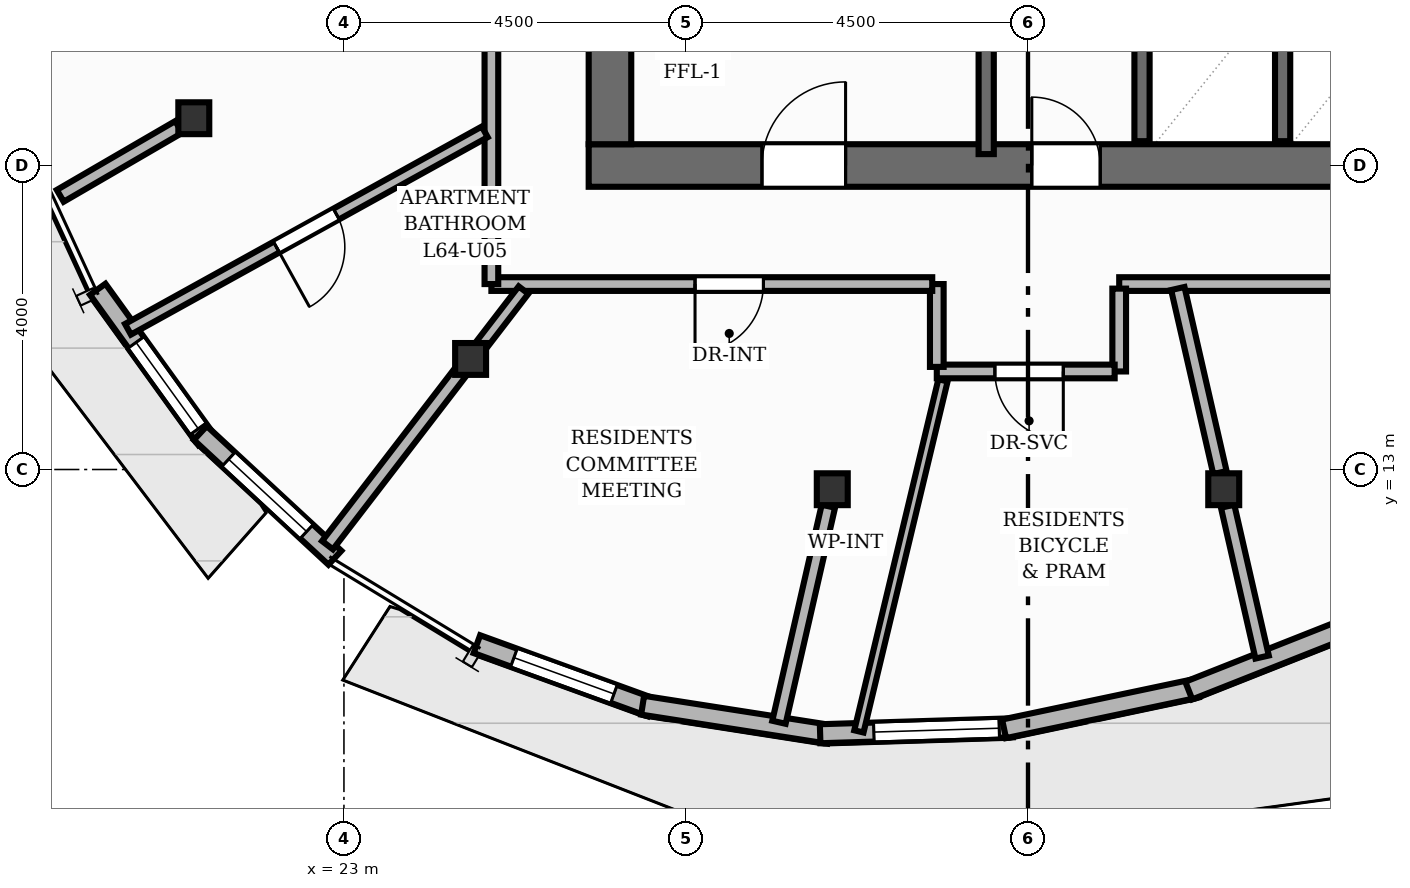
"""IFC4 building model, lengths in metres.
Left out: names, types, materials, properties, quantities, classifications, styles, units other than length and angle.
Written with IfcOpenShell. Run it as: python <this file> out.ifc"""

import sys

from ifc_helpers import new_model, si_unit, direction, frame, frame_2d, origin, origin_2d, place, context, subcontext, project, spatial, rectangle, i_section, extrude, element, fill, save


model = new_model("IFC4")
c1 = context("Model", 3, precision=1e-05, world=origin(), true_north=direction((0.0, 1.0)))
c2 = subcontext(c1, "Body", "Model", "MODEL_VIEW")
j1 = project(units=[si_unit("LENGTHUNIT", "METRE"), si_unit("PLANEANGLEUNIT", "RADIAN")], contexts=[c1])
p1 = place(None, origin())
s1 = spatial("IfcSite", under=j1, at=p1, CompositionType="ELEMENT")
p2 = place(p1, origin())
s2 = spatial("IfcBuilding", under=s1, at=p2, CompositionType="ELEMENT")
p3 = place(p2, frame((0.0, 0.0, 214.24)))
s3 = spatial("IfcBuildingStorey", under=s2, at=p3, CompositionType="ELEMENT", Elevation=214.24)
p4 = place(p3, frame((26.22, 17.0, 0.0), z_axis=(0.0, 0.0, 1.0), x_axis=(1.0, 0.0, 0.0)))
e1 = element("IfcWall", 1, at=p4, inside=s3, PredefinedType="SHEAR", context=c2, shape_type="SweptSolid", body=[
    extrude(rectangle(XDim=11.56, YDim=0.56, at=frame_2d((5.78, 0.0))), origin(), (0.0, 0.0, 1.0), 3.2),
])
p5 = place(p4, frame((2.28, 0.0, 0.0)))
e2 = element("IfcOpeningElement", 2, at=p5, cuts=e1, PredefinedType="OPENING", context=c2, shape_type="SweptSolid", body=[
    extrude(rectangle(XDim=1.1, YDim=2.15, at=frame_2d((0.55, 1.075))), frame((0.0, 0.29, 0.0), z_axis=(0.0, -1.0, 0.0), x_axis=(1.0, 0.0, 0.0)), (0.0, 0.0, 1.0), 0.58),
])
p6 = place(p4, frame((5.83, 0.0, 0.0)))
e3 = element("IfcOpeningElement", 3, at=p6, cuts=e1, PredefinedType="OPENING", context=c2, shape_type="SweptSolid", body=[
    extrude(rectangle(XDim=0.9, YDim=2.1, at=frame_2d((0.45, 1.05))), frame((0.0, 0.29, 0.0), z_axis=(0.0, -1.0, 0.0), x_axis=(1.0, 0.0, 0.0)), (0.0, 0.0, 1.0), 0.58),
])
p7 = place(p3, frame((26.5, 17.28, 0.0), z_axis=(0.0, 0.0, 1.0), x_axis=(0.0, 1.0, 0.0)))
e4 = element("IfcWall", 4, at=p7, inside=s3, PredefinedType="SHEAR", context=c2, shape_type="SweptSolid", body=[
    extrude(rectangle(XDim=13.44, YDim=0.56, at=frame_2d((6.72, 0.0))), origin(), (0.0, 0.0, 1.0), 3.2),
])
for number, where, z_axis, x_axis in (
    (5, (21.025, 17.622, 0.0), (0.0, 0.0, 1.0), (1.0, 0.0, 0.0)),
    (6, (24.667, 14.455, 0.0), (0.0, 0.0, 1.0), (1.0, 0.0, 0.0)),
    (7, (29.425, 12.74, 0.0), (0.0, 0.0, 1.0), (1.0, 0.0, 0.0)),
    (8, (34.575, 12.74, 0.0), (0.0, 0.0, 1.0), (1.0, 0.0, 0.0)),
):
    element("IfcColumn", number, at=place(p3, frame(where, z_axis=z_axis, x_axis=x_axis)), inside=s3, PredefinedType="COLUMN", context=c2, shape_type="SweptSolid", body=[
        extrude(i_section(OverallWidth=0.407, OverallDepth=0.419, WebThickness=0.031, FlangeThickness=0.049, at=origin_2d()), origin(), (0.0, 0.0, 1.0), 3.2),
    ])
p8 = place(p3, frame((21.186, 13.395, 0.0), z_axis=(0.0, 0.0, 1.0), x_axis=(-0.584824573101, 0.811159798497, 0.0)))
e9 = element("IfcWall", 9, at=p8, inside=s3, PredefinedType="SOLIDWALL", context=c2, shape_type="SweptSolid", body=[
    extrude(rectangle(XDim=2.437, YDim=0.25, at=frame_2d((1.218, 0.0))), origin(), (0.0, 0.0, 1.0), 2.96),
])
p9 = place(p8, frame((0.175, 0.0, 0.85)))
e10 = element("IfcOpeningElement", 10, at=p9, cuts=e9, PredefinedType="OPENING", context=c2, shape_type="SweptSolid", body=[
    extrude(rectangle(XDim=1.4, YDim=1.55, at=frame_2d((0.7, 0.775))), frame((0.0, 0.135, 0.0), z_axis=(0.0, -1.0, 0.0), x_axis=(1.0, 0.0, 0.0)), (0.0, 0.0, 1.0), 0.27),
])
p10 = place(p3, frame((22.881, 11.839, 0.0), z_axis=(0.0, 0.0, 1.0), x_axis=(-0.733441361842, 0.679752726173, 0.0)))
e11 = element("IfcWall", 11, at=p10, inside=s3, PredefinedType="SOLIDWALL", context=c2, shape_type="SweptSolid", body=[
    extrude(rectangle(XDim=2.415, YDim=0.25, at=frame_2d((1.207, 0.0))), origin(), (0.0, 0.0, 1.0), 2.96),
])
p11 = place(p10, frame((0.507, 0.0, 0.85)))
e12 = element("IfcOpeningElement", 12, at=p11, cuts=e11, PredefinedType="OPENING", context=c2, shape_type="SweptSolid", body=[
    extrude(rectangle(XDim=1.4, YDim=1.55, at=frame_2d((0.7, 0.775))), frame((0.0, 0.135, 0.0), z_axis=(0.0, -1.0, 0.0), x_axis=(1.0, 0.0, 0.0)), (0.0, 0.0, 1.0), 0.27),
])
p12 = place(p3, frame((27.04, 9.87, 0.0), z_axis=(0.0, 0.0, 1.0), x_axis=(-0.939954186413, 0.341300640851, 0.0)))
e13 = element("IfcWall", 13, at=p12, inside=s3, PredefinedType="SOLIDWALL", context=c2, shape_type="SweptSolid", body=[
    extrude(rectangle(XDim=2.437, YDim=0.25, at=frame_2d((1.219, 0.0))), origin(), (0.0, 0.0, 1.0), 2.96),
])
p13 = place(p12, frame((0.518, 0.0, 0.85)))
e14 = element("IfcOpeningElement", 14, at=p13, cuts=e13, PredefinedType="OPENING", context=c2, shape_type="SweptSolid", body=[
    extrude(rectangle(XDim=1.4, YDim=1.55, at=frame_2d((0.7, 0.775))), frame((0.0, 0.135, 0.0), z_axis=(0.0, -1.0, 0.0), x_axis=(1.0, 0.0, 0.0)), (0.0, 0.0, 1.0), 0.27),
])
p14 = place(p3, frame((29.378, 9.516, 0.0), z_axis=(0.0, 0.0, 1.0), x_axis=(-0.988040195026, 0.154196540209, 0.0)))
e15 = element("IfcWall", 15, at=p14, inside=s3, PredefinedType="SOLIDWALL", context=c2, shape_type="SweptSolid", body=[
    extrude(rectangle(XDim=2.478, YDim=0.25, at=frame_2d((1.239, 0.0))), origin(), (0.0, 0.0, 1.0), 2.96),
])
p15 = place(p3, frame((31.796, 9.601, 0.0), z_axis=(0.0, 0.0, 1.0), x_axis=(-0.999523857129, -0.030855453818, 0.0)))
e16 = element("IfcWall", 16, at=p15, inside=s3, PredefinedType="SOLIDWALL", context=c2, shape_type="SweptSolid", body=[
    extrude(rectangle(XDim=2.532, YDim=0.25, at=frame_2d((1.266, 0.0))), origin(), (0.0, 0.0, 1.0), 2.96),
])
p16 = place(p15, frame((0.175, 0.0, 0.85)))
e17 = element("IfcOpeningElement", 17, at=p16, cuts=e16, PredefinedType="OPENING", context=c2, shape_type="SweptSolid", body=[
    extrude(rectangle(XDim=1.65, YDim=1.55, at=frame_2d((0.825, 0.775))), frame((0.0, 0.135, 0.0), z_axis=(0.0, -1.0, 0.0), x_axis=(1.0, 0.0, 0.0)), (0.0, 0.0, 1.0), 0.27),
])
p17 = place(p3, frame((34.221, 10.123, 0.0), z_axis=(0.0, 0.0, 1.0), x_axis=(-0.978434707222, -0.206556345104, 0.0)))
e18 = element("IfcWall", 18, at=p17, inside=s3, PredefinedType="SOLIDWALL", context=c2, shape_type="SweptSolid", body=[
    extrude(rectangle(XDim=2.592, YDim=0.25, at=frame_2d((1.296, 0.0))), origin(), (0.0, 0.0, 1.0), 2.96),
])
p18 = place(p3, frame((36.58, 11.067, 0.0), z_axis=(0.0, 0.0, 1.0), x_axis=(-0.929861098324, -0.36791077427, 0.0)))
e19 = element("IfcWall", 19, at=p18, inside=s3, PredefinedType="SOLIDWALL", context=c2, shape_type="SweptSolid", body=[
    extrude(rectangle(XDim=2.651, YDim=0.25, at=frame_2d((1.326, 0.0))), origin(), (0.0, 0.0, 1.0), 2.96),
])
p19 = place(p3, frame((31.45, 17.15, 0.0), z_axis=(0.0, 0.0, 1.0), x_axis=(0.0, 1.0, 0.0)))
e20 = element("IfcWall", 20, at=p19, inside=s3, PredefinedType="SHEAR", context=c2, shape_type="SweptSolid", body=[
    extrude(rectangle(XDim=3.5, YDim=0.2, at=frame_2d((1.75, 0.0))), origin(), (0.0, 0.0, 1.0), 3.2),
])
for number, where, z_axis, x_axis in (
    (21, (33.5, 17.32, 0.0), (0.0, 0.0, 1.0), (0.0, 1.0, 0.0)),
    (22, (35.35, 17.32, 0.0), (0.0, 0.0, 1.0), (0.0, 1.0, 0.0)),
):
    element("IfcWall", number, at=place(p3, frame(where, z_axis=z_axis, x_axis=x_axis)), inside=s3, PredefinedType="SHEAR", context=c2, shape_type="SweptSolid", body=[
        extrude(rectangle(XDim=1.86, YDim=0.2, at=frame_2d((0.93, 0.0))), origin(), (0.0, 0.0, 1.0), 3.2),
    ])
p20 = place(p3, frame((20.826, 17.507, 0.0), z_axis=(0.0, 0.0, 1.0), x_axis=(-0.864637155841, -0.502396843879, 0.0)))
e23 = element("IfcWall", 23, at=p20, inside=s3, PredefinedType="PARTITIONING", context=c2, shape_type="SweptSolid", body=[
    extrude(rectangle(XDim=1.803, YDim=0.18, at=frame_2d((0.901, 0.0))), origin(), (0.0, 0.0, 1.0), 2.403),
])
p21 = place(p3, frame((24.527, 14.273, 0.0), z_axis=(0.0, 0.0, 1.0), x_axis=(-0.609244614772, -0.792982344931, 0.0)))
e24 = element("IfcWall", 24, at=p21, inside=s3, PredefinedType="PARTITIONING", context=c2, shape_type="SweptSolid", body=[
    extrude(rectangle(XDim=2.861, YDim=0.18, at=frame_2d((1.43, 0.0))), origin(), (0.0, 0.0, 1.0), 2.403),
])
p22 = place(p3, frame((29.374, 12.517, 0.0), z_axis=(0.0, 0.0, 1.0), x_axis=(-0.222945280676, -0.974830960641, 0.0)))
e25 = element("IfcWall", 25, at=p22, inside=s3, PredefinedType="PARTITIONING", context=c2, shape_type="SweptSolid", body=[
    extrude(rectangle(XDim=2.916, YDim=0.18, at=frame_2d((1.458, 0.0))), origin(), (0.0, 0.0, 1.0), 2.403),
])
p23 = place(p3, frame((34.626, 12.517, 0.0), z_axis=(0.0, 0.0, 1.0), x_axis=(0.222932254148, -0.974833939736, 0.0)))
e26 = element("IfcWall", 26, at=p23, inside=s3, PredefinedType="PARTITIONING", context=c2, shape_type="SweptSolid", body=[
    extrude(rectangle(XDim=2.036, YDim=0.18, at=frame_2d((1.018, 0.0))), origin(), (0.0, 0.0, 1.0), 2.403),
])
p24 = place(p3, frame((39.06, 15.44, 0.0), z_axis=(0.0, 0.0, 1.0), x_axis=(-1.0, 0.0, 0.0)))
e27 = element("IfcWall", 27, at=p24, inside=s3, PredefinedType="PARTITIONING", context=c2, shape_type="SweptSolid", body=[
    extrude(rectangle(XDim=5.86, YDim=0.18, at=frame_2d((2.93, 0.0))), origin(), (0.0, 0.0, 1.0), 2.955),
])
p25 = place(p3, frame((33.2, 15.38, 0.0), z_axis=(0.0, 0.0, 1.0), x_axis=(0.0, -1.0, 0.0)))
e28 = element("IfcWall", 28, at=p25, inside=s3, PredefinedType="PARTITIONING", context=c2, shape_type="SweptSolid", body=[
    extrude(rectangle(XDim=1.09, YDim=0.18, at=frame_2d((0.545, 0.0))), origin(), (0.0, 0.0, 1.0), 2.955),
])
p26 = place(p3, frame((33.14, 14.29, 0.0), z_axis=(0.0, 0.0, 1.0), x_axis=(-1.0, 0.0, 0.0)))
e29 = element("IfcWall", 29, at=p26, inside=s3, PredefinedType="PARTITIONING", context=c2, shape_type="SweptSolid", body=[
    extrude(rectangle(XDim=2.34, YDim=0.18, at=frame_2d((1.17, 0.0))), origin(), (0.0, 0.0, 1.0), 2.955),
])
p27 = place(p26, frame((0.676, 0.0, 0.0)))
e30 = element("IfcOpeningElement", 30, at=p27, cuts=e29, PredefinedType="OPENING", context=c2, shape_type="SweptSolid", body=[
    extrude(rectangle(XDim=0.9, YDim=2.1, at=frame_2d((0.45, 1.05))), frame((0.0, 0.1, 0.0), z_axis=(0.0, -1.0, 0.0), x_axis=(1.0, 0.0, 0.0)), (0.0, 0.0, 1.0), 0.2),
])
p28 = place(p3, frame((30.8, 14.35, 0.0), z_axis=(0.0, 0.0, 1.0), x_axis=(0.0, 1.0, 0.0)))
e31 = element("IfcWall", 31, at=p28, inside=s3, PredefinedType="PARTITIONING", context=c2, shape_type="SweptSolid", body=[
    extrude(rectangle(XDim=1.09, YDim=0.18, at=frame_2d((0.545, 0.0))), origin(), (0.0, 0.0, 1.0), 2.955),
])
p29 = place(p3, frame((30.74, 15.44, 0.0), z_axis=(0.0, 0.0, 1.0), x_axis=(-1.0, 0.0, 0.0)))
e32 = element("IfcWall", 32, at=p29, inside=s3, PredefinedType="PARTITIONING", context=c2, shape_type="SweptSolid", body=[
    extrude(rectangle(XDim=5.8, YDim=0.18, at=frame_2d((2.9, 0.0))), origin(), (0.0, 0.0, 1.0), 2.955),
])
p30 = place(p29, frame((2.221, 0.0, 0.0)))
e33 = element("IfcOpeningElement", 33, at=p30, cuts=e32, PredefinedType="OPENING", context=c2, shape_type="SweptSolid", body=[
    extrude(rectangle(XDim=0.9, YDim=2.1, at=frame_2d((0.45, 1.05))), frame((0.0, 0.1, 0.0), z_axis=(0.0, -1.0, 0.0), x_axis=(1.0, 0.0, 0.0)), (0.0, 0.0, 1.0), 0.2),
])
p31 = place(p3, frame((24.94, 15.44, 0.0), z_axis=(0.0, 0.0, 1.0), x_axis=(0.0, 1.0, 0.0)))
e34 = element("IfcWall", 34, at=p31, inside=s3, PredefinedType="PARTITIONING", context=c2, shape_type="SweptSolid", body=[
    extrude(rectangle(XDim=17.12, YDim=0.18, at=frame_2d((8.56, 0.0))), origin(), (0.0, 0.0, 1.0), 2.955),
])
p32 = place(p31, frame((4.404, 0.0, 0.0)))
e35 = element("IfcOpeningElement", 35, at=p32, cuts=e34, PredefinedType="OPENING", context=c2, shape_type="SweptSolid", body=[
    extrude(rectangle(XDim=1.05, YDim=2.15, at=frame_2d((0.525, 1.075))), frame((0.0, 0.1, 0.0), z_axis=(0.0, -1.0, 0.0), x_axis=(1.0, 0.0, 0.0)), (0.0, 0.0, 1.0), 0.2),
])
p33 = place(p3, frame((29.775, 9.554, 0.0), z_axis=(0.0, 0.0, 1.0), x_axis=(0.232836379221, 0.972515923012, 0.0)))
e36 = element("IfcWall", 36, at=p33, inside=s3, PredefinedType="PARTITIONING", context=c2, shape_type="SweptSolid", body=[
    extrude(rectangle(XDim=4.75, YDim=0.125, at=frame_2d((2.375, 0.0))), origin(), (0.0, 0.0, 1.0), 2.955),
])
p34 = place(p3, frame((33.971, 15.382, 0.0), z_axis=(0.0, 0.0, 1.0), x_axis=(0.222950196428, -0.974829836388, 0.0)))
e37 = element("IfcWall", 37, at=p34, inside=s3, PredefinedType="PARTITIONING", context=c2, shape_type="SweptSolid", body=[
    extrude(rectangle(XDim=2.485, YDim=0.18, at=frame_2d((1.242, 0.0))), origin(), (0.0, 0.0, 1.0), 2.403),
])
p35 = place(p3, frame((24.806, 14.636, 0.0), z_axis=(0.0, 0.0, 1.0), x_axis=(0.609284308489, 0.792951846854, 0.0)))
e38 = element("IfcWall", 38, at=p35, inside=s3, PredefinedType="PLUMBINGWALL", context=c2, shape_type="SweptSolid", body=[
    extrude(rectangle(XDim=0.913, YDim=0.16, at=frame_2d((0.457, 0.0))), origin(), (0.0, 0.0, 1.0), 2.403),
])
p36 = place(p3, frame((24.853, 17.443, 0.0), z_axis=(0.0, 0.0, 1.0), x_axis=(-0.874969642777, -0.484177781624, 0.0)))
e39 = element("IfcWall", 39, at=p36, inside=s3, PredefinedType="PLUMBINGWALL", context=c2, shape_type="SweptSolid", body=[
    extrude(rectangle(XDim=5.365, YDim=0.16, at=frame_2d((2.682, 0.0))), origin(), (0.0, 0.0, 1.0), 2.955),
])
p37 = place(p36, frame((2.232, 0.0, 0.0)))
e40 = element("IfcOpeningElement", 40, at=p37, cuts=e39, PredefinedType="OPENING", context=c2, shape_type="SweptSolid", body=[
    extrude(rectangle(XDim=0.9, YDim=2.1, at=frame_2d((0.45, 1.05))), frame((0.0, 0.09, 0.0), z_axis=(0.0, -1.0, 0.0), x_axis=(1.0, 0.0, 0.0)), (0.0, 0.0, 1.0), 0.18),
])
p38 = place(p9, origin())
e41 = element("IfcWindow", 41, at=p38, inside=s3, PartitioningType="SINGLE_PANEL", PredefinedType="WINDOW", context=c2, shape_type="SweptSolid", body=[
    extrude(rectangle(XDim=1.4, YDim=1.55, at=frame_2d((0.7, 0.775))), frame((0.0, 0.03, 0.0), z_axis=(0.0, -1.0, 0.0), x_axis=(1.0, 0.0, 0.0)), (0.0, 0.0, 1.0), 0.06),
])
fill(e10, e41)
p39 = place(p11, origin())
e42 = element("IfcWindow", 42, at=p39, inside=s3, PartitioningType="SINGLE_PANEL", PredefinedType="WINDOW", context=c2, shape_type="SweptSolid", body=[
    extrude(rectangle(XDim=1.4, YDim=1.55, at=frame_2d((0.7, 0.775))), frame((0.0, 0.03, 0.0), z_axis=(0.0, -1.0, 0.0), x_axis=(1.0, 0.0, 0.0)), (0.0, 0.0, 1.0), 0.06),
])
fill(e12, e42)
p40 = place(p13, origin())
e43 = element("IfcWindow", 43, at=p40, inside=s3, PartitioningType="SINGLE_PANEL", PredefinedType="WINDOW", context=c2, shape_type="SweptSolid", body=[
    extrude(rectangle(XDim=1.4, YDim=1.55, at=frame_2d((0.7, 0.775))), frame((0.0, 0.03, 0.0), z_axis=(0.0, -1.0, 0.0), x_axis=(1.0, 0.0, 0.0)), (0.0, 0.0, 1.0), 0.06),
])
fill(e14, e43)
p41 = place(p16, origin())
e44 = element("IfcWindow", 44, at=p41, inside=s3, PartitioningType="SINGLE_PANEL", PredefinedType="WINDOW", context=c2, shape_type="SweptSolid", body=[
    extrude(rectangle(XDim=1.65, YDim=1.55, at=frame_2d((0.825, 0.775))), frame((0.0, 0.03, 0.0), z_axis=(0.0, -1.0, 0.0), x_axis=(1.0, 0.0, 0.0)), (0.0, 0.0, 1.0), 0.06),
])
fill(e17, e44)
p42 = place(p5, origin())
e45 = element("IfcDoor", 45, at=p42, inside=s3, OperationType="SINGLE_SWING_RIGHT", PredefinedType="DOOR", context=c2, shape_type="SweptSolid", body=[
    extrude(rectangle(XDim=1.1, YDim=2.15, at=frame_2d((0.55, 1.075))), frame((0.0, 0.025, 0.0), z_axis=(0.0, -1.0, 0.0), x_axis=(1.0, 0.0, 0.0)), (0.0, 0.0, 1.0), 0.05),
])
fill(e2, e45)
p43 = place(p6, origin())
e46 = element("IfcDoor", 46, at=p43, inside=s3, OperationType="SINGLE_SWING_LEFT", PredefinedType="DOOR", context=c2, shape_type="SweptSolid", body=[
    extrude(rectangle(XDim=0.9, YDim=2.1, at=frame_2d((0.45, 1.05))), frame((0.0, 0.025, 0.0), z_axis=(0.0, -1.0, 0.0), x_axis=(1.0, 0.0, 0.0)), (0.0, 0.0, 1.0), 0.05),
])
fill(e3, e46)
p44 = place(p27, origin())
e47 = element("IfcDoor", 47, at=p44, inside=s3, OperationType="SINGLE_SWING_LEFT", PredefinedType="DOOR", context=c2, shape_type="SweptSolid", body=[
    extrude(rectangle(XDim=0.9, YDim=2.1, at=frame_2d((0.45, 1.05))), frame((0.0, 0.025, 0.0), z_axis=(0.0, -1.0, 0.0), x_axis=(1.0, 0.0, 0.0)), (0.0, 0.0, 1.0), 0.05),
])
fill(e30, e47)
p45 = place(p30, origin())
e48 = element("IfcDoor", 48, at=p45, inside=s3, OperationType="SINGLE_SWING_RIGHT", PredefinedType="DOOR", context=c2, shape_type="SweptSolid", body=[
    extrude(rectangle(XDim=0.9, YDim=2.1, at=frame_2d((0.45, 1.05))), frame((0.0, 0.025, 0.0), z_axis=(0.0, -1.0, 0.0), x_axis=(1.0, 0.0, 0.0)), (0.0, 0.0, 1.0), 0.05),
])
fill(e33, e48)
p46 = place(p37, origin())
e49 = element("IfcDoor", 49, at=p46, inside=s3, OperationType="SINGLE_SWING_RIGHT", PredefinedType="DOOR", context=c2, shape_type="SweptSolid", body=[
    extrude(rectangle(XDim=0.9, YDim=2.1, at=frame_2d((0.45, 1.05))), frame((0.0, 0.025, 0.0), z_axis=(0.0, -1.0, 0.0), x_axis=(1.0, 0.0, 0.0)), (0.0, 0.0, 1.0), 0.05),
])
fill(e40, e49)
save(model, sys.argv[1])
